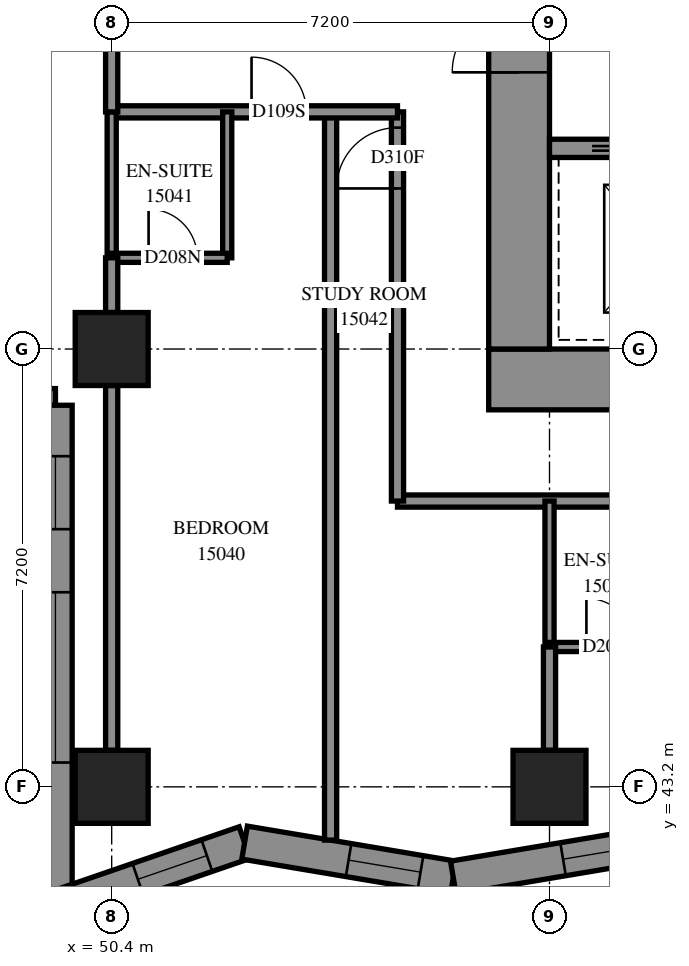
"""IFC4 building model, lengths in metres.
Left out: names, types, materials, properties, quantities, classifications, styles, units other than length and angle.
Written with IfcOpenShell. Run it as: python <this file> out.ifc"""

import sys

from ifc_helpers import new_model, si_unit, direction, frame, frame_2d, origin, origin_2d, place, context, subcontext, project, spatial, polyline, rectangle, outline, extrude, element, fill, save


model = new_model("IFC4")
c1 = context("Model", 3, precision=1e-05, world=origin(), true_north=direction((0.0, 1.0)))
c2 = subcontext(c1, "Body", "Model", "MODEL_VIEW")
j1 = project(units=[si_unit("LENGTHUNIT", "METRE"), si_unit("PLANEANGLEUNIT", "RADIAN")], contexts=[c1])
p1 = place(None, origin())
s1 = spatial("IfcSite", under=j1, at=p1, CompositionType="ELEMENT")
p2 = place(p1, origin())
s2 = spatial("IfcBuilding", under=s1, at=p2, CompositionType="ELEMENT")
p3 = place(p2, frame((0.0, 0.0, 57.6)))
s3 = spatial("IfcBuildingStorey", under=s2, at=p3, CompositionType="ELEMENT", Elevation=57.6)
for number, where, z_axis, x_axis in (
    (1, (50.4, 43.2, 0.0), (0.0, 0.0, 1.0), (1.0, 0.0, 0.0)),
    (2, (50.4, 50.4, 0.0), (0.0, 0.0, 1.0), (1.0, 0.0, 0.0)),
    (3, (57.6, 43.2, 0.0), (0.0, 0.0, 1.0), (1.0, 0.0, 0.0)),
):
    element("IfcColumn", number, at=place(p3, frame(where, z_axis=z_axis, x_axis=x_axis)), inside=s3, PredefinedType="COLUMN", context=c2, shape_type="SweptSolid", body=[
        extrude(rectangle(XDim=1.2, YDim=1.2, at=origin_2d()), origin(), (0.0, 0.0, 1.0), 3.1),
    ])
p4 = place(p3, frame((56.6, 49.9, -0.3), z_axis=(0.0, 0.0, 1.0), x_axis=(1.0, 0.0, 0.0)))
e4 = element("IfcWall", 4, at=p4, inside=s3, PredefinedType="SHEAR", context=c2, shape_type="SweptSolid", body=[
    extrude(rectangle(XDim=16.4, YDim=1.0, at=frame_2d((8.2, 0.0))), origin(), (0.0, 0.0, 1.0), 2.7),
])
p5 = place(p3, frame((57.1, 50.4, -0.3), z_axis=(0.0, 0.0, 1.0), x_axis=(0.0, 1.0, 0.0)))
e5 = element("IfcWall", 5, at=p5, inside=s3, PredefinedType="SHEAR", context=c2, shape_type="SweptSolid", body=[
    extrude(rectangle(XDim=14.4, YDim=1.0, at=frame_2d((7.2, 0.0))), origin(), (0.0, 0.0, 1.0), 2.7),
])
p6 = place(p5, frame((4.55, 0.0, 0.3)))
e6 = element("IfcOpeningElement", 6, at=p6, cuts=e5, PredefinedType="OPENING", context=c2, shape_type="SweptSolid", body=[
    extrude(rectangle(XDim=1.1, YDim=2.1, at=frame_2d((0.55, 1.05))), frame((0.0, 0.51, 0.0), z_axis=(0.0, -1.0, 0.0), x_axis=(1.0, 0.0, 0.0)), (0.0, 0.0, 1.0), 1.02),
])
p7 = place(p5, frame((11.35, 0.0, 0.3)))
e7 = element("IfcOpeningElement", 7, at=p7, cuts=e5, PredefinedType="OPENING", context=c2, shape_type="SweptSolid", body=[
    extrude(rectangle(XDim=1.1, YDim=2.1, at=frame_2d((0.55, 1.05))), frame((0.0, 0.51, 0.0), z_axis=(0.0, -1.0, 0.0), x_axis=(1.0, 0.0, 0.0)), (0.0, 0.0, 1.0), 1.02),
])
p8 = place(p3, frame((57.6, 53.7, 0.0), z_axis=(0.0, 0.0, 1.0), x_axis=(1.0, 0.0, 0.0)))
e8 = element("IfcWall", 8, at=p8, inside=s3, PredefinedType="SOLIDWALL", context=c2, shape_type="SweptSolid", body=[
    extrude(rectangle(XDim=14.4, YDim=0.3, at=frame_2d((7.2, 0.0))), origin(), (0.0, 0.0, 1.0), 3.1),
])
p9 = place(p8, frame((1.25, 0.0, 0.0)))
e9 = element("IfcOpeningElement", 9, at=p9, cuts=e8, PredefinedType="OPENING", context=c2, shape_type="SweptSolid", body=[
    extrude(rectangle(XDim=1.1, YDim=2.1, at=frame_2d((0.55, 1.05))), frame((0.0, 0.16, 0.0), z_axis=(0.0, -1.0, 0.0), x_axis=(1.0, 0.0, 0.0)), (0.0, 0.0, 1.0), 0.32),
])
p10 = place(p8, frame((4.85, 0.0, 0.0)))
e10 = element("IfcOpeningElement", 10, at=p10, cuts=e8, PredefinedType="OPENING", context=c2, shape_type="SweptSolid", body=[
    extrude(rectangle(XDim=1.1, YDim=2.1, at=frame_2d((0.55, 1.05))), frame((0.0, 0.16, 0.0), z_axis=(0.0, -1.0, 0.0), x_axis=(1.0, 0.0, 0.0)), (0.0, 0.0, 1.0), 0.32),
])
p11 = place(p8, frame((8.45, 0.0, 0.0)))
e11 = element("IfcOpeningElement", 11, at=p11, cuts=e8, PredefinedType="OPENING", context=c2, shape_type="SweptSolid", body=[
    extrude(rectangle(XDim=1.1, YDim=2.1, at=frame_2d((0.55, 1.05))), frame((0.0, 0.16, 0.0), z_axis=(0.0, -1.0, 0.0), x_axis=(1.0, 0.0, 0.0)), (0.0, 0.0, 1.0), 0.32),
])
p12 = place(p8, frame((12.05, 0.0, 0.0)))
e12 = element("IfcOpeningElement", 12, at=p12, cuts=e8, PredefinedType="OPENING", context=c2, shape_type="SweptSolid", body=[
    extrude(rectangle(XDim=1.1, YDim=2.1, at=frame_2d((0.55, 1.05))), frame((0.0, 0.16, 0.0), z_axis=(0.0, -1.0, 0.0), x_axis=(1.0, 0.0, 0.0)), (0.0, 0.0, 1.0), 0.32),
])
p13 = place(p3, frame((42.275, 49.475, 0.0), z_axis=(0.0, 0.0, 1.0), x_axis=(1.0, 0.0, 0.0)))
e13 = element("IfcWall", 13, at=p13, inside=s3, PredefinedType="SOLIDWALL", context=c2, shape_type="SweptSolid", body=[
    extrude(outline(polyline([(-0.275, -0.275), (6.925, -0.275), (7.475, 0.275), (0.275, 0.275), (-0.275, -0.275)])), origin(), (0.0, 0.0, 1.0), 3.1),
])
p14 = place(p13, frame((1.325, 0.0, 0.5)))
e14 = element("IfcOpeningElement", 14, at=p14, cuts=e13, PredefinedType="OPENING", context=c2, shape_type="SweptSolid", body=[
    extrude(rectangle(XDim=2.8, YDim=2.45, at=frame_2d((1.4, 1.225))), frame((0.0, 0.285, 0.0), z_axis=(0.0, -1.0, 0.0), x_axis=(1.0, 0.0, 0.0)), (0.0, 0.0, 1.0), 0.57),
])
p15 = place(p13, frame((5.162, 0.0, 0.5)))
e15 = element("IfcOpeningElement", 15, at=p15, cuts=e13, PredefinedType="OPENING", context=c2, shape_type="SweptSolid", body=[
    extrude(rectangle(XDim=1.2, YDim=2.45, at=frame_2d((0.6, 1.225))), frame((0.0, 0.285, 0.0), z_axis=(0.0, -1.0, 0.0), x_axis=(1.0, 0.0, 0.0)), (0.0, 0.0, 1.0), 0.57),
])
p16 = place(p3, frame((49.475, 49.475, 0.0), z_axis=(0.0, 0.0, 1.0), x_axis=(0.0, -1.0, 0.0)))
e16 = element("IfcWall", 16, at=p16, inside=s3, PredefinedType="SOLIDWALL", context=c2, shape_type="SweptSolid", body=[
    extrude(outline(polyline([(0.275, -0.275), (8.647, -0.275), (7.876, 0.275), (-0.275, 0.275), (0.275, -0.275)])), origin(), (0.0, 0.0, 1.0), 3.1),
])
p17 = place(p16, frame((3.075, 0.0, 0.5)))
e17 = element("IfcOpeningElement", 17, at=p17, cuts=e16, PredefinedType="OPENING", context=c2, shape_type="SweptSolid", body=[
    extrude(rectangle(XDim=2.8, YDim=2.45, at=frame_2d((1.4, 1.225))), frame((0.0, 0.285, 0.0), z_axis=(0.0, -1.0, 0.0), x_axis=(1.0, 0.0, 0.0)), (0.0, 0.0, 1.0), 0.57),
])
p18 = place(p16, frame((0.838, 0.0, 0.5)))
e18 = element("IfcOpeningElement", 18, at=p18, cuts=e16, PredefinedType="OPENING", context=c2, shape_type="SweptSolid", body=[
    extrude(rectangle(XDim=1.2, YDim=2.45, at=frame_2d((0.6, 1.225))), frame((0.0, 0.285, 0.0), z_axis=(0.0, -1.0, 0.0), x_axis=(1.0, 0.0, 0.0)), (0.0, 0.0, 1.0), 0.57),
])
p19 = place(p3, frame((49.475, 41.213, 0.0), z_axis=(0.0, 0.0, 1.0), x_axis=(0.9456585559, 0.3251613379, 0.0)))
e19 = element("IfcWall", 19, at=p19, inside=s3, PredefinedType="SOLIDWALL", context=c2, shape_type="SweptSolid", body=[
    extrude(outline(polyline([(-0.385, -0.275), (3.219, -0.275), (3.359, 0.275), (0.385, 0.275), (-0.385, -0.275)])), origin(), (0.0, 0.0, 1.0), 3.1),
])
p20 = place(p19, frame((1.434, 0.0, 0.5)))
e20 = element("IfcOpeningElement", 20, at=p20, cuts=e19, PredefinedType="OPENING", context=c2, shape_type="SweptSolid", body=[
    extrude(rectangle(XDim=1.2, YDim=2.45, at=frame_2d((0.6, 1.225))), frame((0.0, 0.285, 0.0), z_axis=(0.0, -1.0, 0.0), x_axis=(1.0, 0.0, 0.0)), (0.0, 0.0, 1.0), 0.57),
])
p21 = place(p3, frame((52.585, 42.283, 0.0), z_axis=(0.0, 0.0, 1.0), x_axis=(0.9862084709, -0.1655078606, 0.0)))
e21 = element("IfcWall", 21, at=p21, inside=s3, PredefinedType="SOLIDWALL", context=c2, shape_type="SweptSolid", body=[
    extrude(outline(polyline([(0.07, -0.275), (3.526, -0.275), (3.434, 0.275), (-0.07, 0.275), (0.07, -0.275)])), origin(), (0.0, 0.0, 1.0), 3.1),
])
p22 = place(p21, frame((1.734, 0.0, 0.5)))
e22 = element("IfcOpeningElement", 22, at=p22, cuts=e21, PredefinedType="OPENING", context=c2, shape_type="SweptSolid", body=[
    extrude(rectangle(XDim=1.2, YDim=2.45, at=frame_2d((0.6, 1.225))), frame((0.0, 0.285, 0.0), z_axis=(0.0, -1.0, 0.0), x_axis=(1.0, 0.0, 0.0)), (0.0, 0.0, 1.0), 0.57),
])
p23 = place(p3, frame((56.018, 41.707, 0.0), z_axis=(0.0, 0.0, 1.0), x_axis=(0.9862119159, 0.1654873316, 0.0)))
e23 = element("IfcWall", 23, at=p23, inside=s3, PredefinedType="SOLIDWALL", context=c2, shape_type="SweptSolid", body=[
    extrude(outline(polyline([(-0.046, -0.275), (3.41, -0.275), (3.503, 0.275), (0.046, 0.275), (-0.046, -0.275)])), origin(), (0.0, 0.0, 1.0), 3.1),
])
p24 = place(p23, frame((1.831, 0.0, 0.5)))
e24 = element("IfcOpeningElement", 24, at=p24, cuts=e23, PredefinedType="OPENING", context=c2, shape_type="SweptSolid", body=[
    extrude(rectangle(XDim=1.2, YDim=2.45, at=frame_2d((0.6, 1.225))), frame((0.0, 0.285, 0.0), z_axis=(0.0, -1.0, 0.0), x_axis=(1.0, 0.0, 0.0)), (0.0, 0.0, 1.0), 0.57),
])
p25 = place(p3, frame((55.1, 47.9, 0.0), z_axis=(0.0, 0.0, 1.0), x_axis=(1.0, 0.0, 0.0)))
e25 = element("IfcWall", 25, at=p25, inside=s3, PredefinedType="PARTITIONING", context=c2, shape_type="SweptSolid", body=[
    extrude(rectangle(XDim=19.208, YDim=0.2, at=frame_2d((9.604, 0.0))), origin(), (0.0, 0.0, 1.0), 3.1),
])
p26 = place(p25, frame((6.399, 0.0, 0.0)))
e26 = element("IfcOpeningElement", 26, at=p26, cuts=e25, PredefinedType="OPENING", context=c2, shape_type="SweptSolid", body=[
    extrude(rectangle(XDim=0.9, YDim=2.1, at=frame_2d((0.45, 1.05))), frame((0.0, 0.11, 0.0), z_axis=(0.0, -1.0, 0.0), x_axis=(1.0, 0.0, 0.0)), (0.0, 0.0, 1.0), 0.22),
])
p27 = place(p25, frame((13.561, 0.0, 0.0)))
e27 = element("IfcOpeningElement", 27, at=p27, cuts=e25, PredefinedType="OPENING", context=c2, shape_type="SweptSolid", body=[
    extrude(rectangle(XDim=0.9, YDim=2.1, at=frame_2d((0.45, 1.05))), frame((0.0, 0.11, 0.0), z_axis=(0.0, -1.0, 0.0), x_axis=(1.0, 0.0, 0.0)), (0.0, 0.0, 1.0), 0.22),
])
p28 = place(p3, frame((54.0, 42.324, 0.0), z_axis=(0.0, 0.0, 1.0), x_axis=(0.0, 1.0, 0.0)))
e28 = element("IfcWall", 28, at=p28, inside=s3, PredefinedType="PARTITIONING", context=c2, shape_type="SweptSolid", body=[
    extrude(rectangle(XDim=11.976, YDim=0.2, at=frame_2d((5.988, 0.0))), origin(), (0.0, 0.0, 1.0), 3.1),
])
p29 = place(p3, frame((55.1, 47.9, 0.0), z_axis=(0.0, 0.0, 1.0), x_axis=(0.0, 1.0, 0.0)))
e29 = element("IfcWall", 29, at=p29, inside=s3, PredefinedType="PARTITIONING", context=c2, shape_type="SweptSolid", body=[
    extrude(rectangle(XDim=6.4, YDim=0.2, at=frame_2d((3.2, 0.0))), origin(), (0.0, 0.0, 1.0), 3.1),
])
p30 = place(p29, frame((5.141, 0.0, 0.0)))
e30 = element("IfcOpeningElement", 30, at=p30, cuts=e29, PredefinedType="OPENING", context=c2, shape_type="SweptSolid", body=[
    extrude(rectangle(XDim=1.0, YDim=2.1, at=frame_2d((0.5, 1.05))), frame((0.0, 0.11, 0.0), z_axis=(0.0, -1.0, 0.0), x_axis=(1.0, 0.0, 0.0)), (0.0, 0.0, 1.0), 0.22),
])
p31 = place(p3, frame((50.4, 43.8, 0.0), z_axis=(0.0, 0.0, 1.0), x_axis=(0.0, 1.0, 0.0)))
e31 = element("IfcWall", 31, at=p31, inside=s3, PredefinedType="PARTITIONING", context=c2, shape_type="SweptSolid", body=[
    extrude(rectangle(XDim=6.0, YDim=0.2, at=frame_2d((3.0, 0.0))), origin(), (0.0, 0.0, 1.0), 2.6),
])
p32 = place(p3, frame((50.4, 54.3, 0.0), z_axis=(0.0, 0.0, 1.0), x_axis=(1.0, 0.0, 0.0)))
e32 = element("IfcWall", 32, at=p32, inside=s3, PredefinedType="PARTITIONING", context=c2, shape_type="SweptSolid", body=[
    extrude(rectangle(XDim=4.7, YDim=0.2, at=frame_2d((2.35, 0.0))), origin(), (0.0, 0.0, 1.0), 3.1),
])
p33 = place(p32, frame((2.3, 0.0, 0.0)))
e33 = element("IfcOpeningElement", 33, at=p33, cuts=e32, PredefinedType="OPENING", context=c2, shape_type="SweptSolid", body=[
    extrude(rectangle(XDim=0.9, YDim=2.1, at=frame_2d((0.45, 1.05))), frame((0.0, 0.11, 0.0), z_axis=(0.0, -1.0, 0.0), x_axis=(1.0, 0.0, 0.0)), (0.0, 0.0, 1.0), 0.22),
])
for number, where, z_axis, x_axis in (
    (34, (52.3, 51.9, 0.0), (0.0, 0.0, 1.0), (0.0, 1.0, 0.0)),
    (35, (50.4, 51.9, 0.0), (0.0, 0.0, 1.0), (0.0, 1.0, 0.0)),
    (36, (57.6, 45.5, 0.0), (0.0, 0.0, 1.0), (0.0, 1.0, 0.0)),
):
    element("IfcWall", number, at=place(p3, frame(where, z_axis=z_axis, x_axis=x_axis)), inside=s3, PredefinedType="PARTITIONING", context=c2, shape_type="SweptSolid", body=[
        extrude(rectangle(XDim=2.4, YDim=0.15, at=frame_2d((1.2, 0.0))), origin(), (0.0, 0.0, 1.0), 3.1),
    ])
p34 = place(p3, frame((50.4, 51.9, 0.0), z_axis=(0.0, 0.0, 1.0), x_axis=(1.0, 0.0, 0.0)))
e37 = element("IfcWall", 37, at=p34, inside=s3, PredefinedType="PARTITIONING", context=c2, shape_type="SweptSolid", body=[
    extrude(rectangle(XDim=1.9, YDim=0.15, at=frame_2d((0.95, 0.0))), origin(), (0.0, 0.0, 1.0), 3.1),
])
p35 = place(p34, frame((0.607, 0.0, 0.0)))
e38 = element("IfcOpeningElement", 38, at=p35, cuts=e37, PredefinedType="OPENING", context=c2, shape_type="SweptSolid", body=[
    extrude(rectangle(XDim=0.8, YDim=2.1, at=frame_2d((0.4, 1.05))), frame((0.0, 0.085, 0.0), z_axis=(0.0, -1.0, 0.0), x_axis=(1.0, 0.0, 0.0)), (0.0, 0.0, 1.0), 0.17),
])
p36 = place(p3, frame((57.6, 45.5, 0.0), z_axis=(0.0, 0.0, 1.0), x_axis=(1.0, 0.0, 0.0)))
e39 = element("IfcWall", 39, at=p36, inside=s3, PredefinedType="PARTITIONING", context=c2, shape_type="SweptSolid", body=[
    extrude(rectangle(XDim=1.9, YDim=0.15, at=frame_2d((0.95, 0.0))), origin(), (0.0, 0.0, 1.0), 3.1),
])
p37 = place(p36, frame((0.607, 0.0, 0.0)))
e40 = element("IfcOpeningElement", 40, at=p37, cuts=e39, PredefinedType="OPENING", context=c2, shape_type="SweptSolid", body=[
    extrude(rectangle(XDim=0.8, YDim=2.1, at=frame_2d((0.4, 1.05))), frame((0.0, 0.085, 0.0), z_axis=(0.0, -1.0, 0.0), x_axis=(1.0, 0.0, 0.0)), (0.0, 0.0, 1.0), 0.17),
])
p38 = place(p3, frame((50.4, 54.3, 0.0), z_axis=(0.0, 0.0, 1.0), x_axis=(0.0, 1.0, 0.0)))
e41 = element("IfcWall", 41, at=p38, inside=s3, PredefinedType="PARTITIONING", context=c2, shape_type="SweptSolid", body=[
    extrude(rectangle(XDim=1.8, YDim=0.2, at=frame_2d((0.9, 0.0))), origin(), (0.0, 0.0, 1.0), 3.1),
])
p39 = place(p3, frame((57.6, 43.8, 0.0), z_axis=(0.0, 0.0, 1.0), x_axis=(0.0, 1.0, 0.0)))
e42 = element("IfcWall", 42, at=p39, inside=s3, PredefinedType="PARTITIONING", context=c2, shape_type="SweptSolid", body=[
    extrude(rectangle(XDim=1.7, YDim=0.2, at=frame_2d((0.85, 0.0))), origin(), (0.0, 0.0, 1.0), 3.1),
])
p40 = place(p3, frame((50.4, 51.0, 0.0), z_axis=(0.0, 0.0, 1.0), x_axis=(0.0, 1.0, 0.0)))
e43 = element("IfcWall", 43, at=p40, inside=s3, PredefinedType="PARTITIONING", context=c2, shape_type="SweptSolid", body=[
    extrude(rectangle(XDim=0.9, YDim=0.2, at=frame_2d((0.45, 0.0))), origin(), (0.0, 0.0, 1.0), 3.1),
])
p41 = place(p17, origin())
e44 = element("IfcWindow", 44, at=p41, inside=s3, PartitioningType="SINGLE_PANEL", PredefinedType="WINDOW", context=c2, shape_type="SweptSolid", body=[
    extrude(rectangle(XDim=2.8, YDim=2.45, at=frame_2d((1.4, 1.225))), frame((0.0, 0.155, 0.0), z_axis=(0.0, -1.0, 0.0), x_axis=(1.0, 0.0, 0.0)), (0.0, 0.0, 1.0), 0.06),
])
fill(e17, e44)
p42 = place(p18, origin())
e45 = element("IfcWindow", 45, at=p42, inside=s3, PartitioningType="SINGLE_PANEL", PredefinedType="WINDOW", context=c2, shape_type="SweptSolid", body=[
    extrude(rectangle(XDim=1.2, YDim=2.45, at=frame_2d((0.6, 1.225))), frame((0.0, 0.155, 0.0), z_axis=(0.0, -1.0, 0.0), x_axis=(1.0, 0.0, 0.0)), (0.0, 0.0, 1.0), 0.06),
])
fill(e18, e45)
p43 = place(p20, origin())
e46 = element("IfcWindow", 46, at=p43, inside=s3, PartitioningType="SINGLE_PANEL", PredefinedType="WINDOW", context=c2, shape_type="SweptSolid", body=[
    extrude(rectangle(XDim=1.2, YDim=2.45, at=frame_2d((0.6, 1.225))), frame((0.0, 0.155, 0.0), z_axis=(0.0, -1.0, 0.0), x_axis=(1.0, 0.0, 0.0)), (0.0, 0.0, 1.0), 0.06),
])
fill(e20, e46)
p44 = place(p22, origin())
e47 = element("IfcWindow", 47, at=p44, inside=s3, PartitioningType="SINGLE_PANEL", PredefinedType="WINDOW", context=c2, shape_type="SweptSolid", body=[
    extrude(rectangle(XDim=1.2, YDim=2.45, at=frame_2d((0.6, 1.225))), frame((0.0, 0.155, 0.0), z_axis=(0.0, -1.0, 0.0), x_axis=(1.0, 0.0, 0.0)), (0.0, 0.0, 1.0), 0.06),
])
fill(e22, e47)
p45 = place(p24, origin())
e48 = element("IfcWindow", 48, at=p45, inside=s3, PartitioningType="SINGLE_PANEL", PredefinedType="WINDOW", context=c2, shape_type="SweptSolid", body=[
    extrude(rectangle(XDim=1.2, YDim=2.45, at=frame_2d((0.6, 1.225))), frame((0.0, 0.155, 0.0), z_axis=(0.0, -1.0, 0.0), x_axis=(1.0, 0.0, 0.0)), (0.0, 0.0, 1.0), 0.06),
])
fill(e24, e48)
p46 = place(p6, origin())
e49 = element("IfcDoor", 49, at=p46, inside=s3, OperationType="DOUBLE_DOOR_SINGLE_SWING", PredefinedType="DOOR", context=c2, shape_type="SweptSolid", body=[
    extrude(rectangle(XDim=1.1, YDim=2.1, at=frame_2d((0.55, 1.05))), frame((0.0, 0.025, 0.0), z_axis=(0.0, -1.0, 0.0), x_axis=(1.0, 0.0, 0.0)), (0.0, 0.0, 1.0), 0.05),
])
fill(e6, e49)
p47 = place(p33, origin())
e50 = element("IfcDoor", 50, at=p47, inside=s3, OperationType="SINGLE_SWING_LEFT", PredefinedType="DOOR", context=c2, shape_type="SweptSolid", body=[
    extrude(rectangle(XDim=0.9, YDim=2.1, at=frame_2d((0.45, 1.05))), frame((0.0, 0.025, 0.0), z_axis=(0.0, -1.0, 0.0), x_axis=(1.0, 0.0, 0.0)), (0.0, 0.0, 1.0), 0.05),
])
fill(e33, e50)
p48 = place(p35, origin())
e51 = element("IfcDoor", 51, at=p48, inside=s3, OperationType="SINGLE_SWING_RIGHT", PredefinedType="DOOR", context=c2, shape_type="SweptSolid", body=[
    extrude(rectangle(XDim=0.8, YDim=2.1, at=frame_2d((0.4, 1.05))), frame((0.0, 0.025, 0.0), z_axis=(0.0, -1.0, 0.0), x_axis=(1.0, 0.0, 0.0)), (0.0, 0.0, 1.0), 0.05),
])
fill(e38, e51)
p49 = place(p30, origin())
e52 = element("IfcDoor", 52, at=p49, inside=s3, OperationType="SINGLE_SWING_RIGHT", PredefinedType="DOOR", context=c2, shape_type="SweptSolid", body=[
    extrude(rectangle(XDim=1.0, YDim=2.1, at=frame_2d((0.5, 1.05))), frame((0.0, 0.025, 0.0), z_axis=(0.0, -1.0, 0.0), x_axis=(1.0, 0.0, 0.0)), (0.0, 0.0, 1.0), 0.05),
])
fill(e30, e52)
p50 = place(p37, origin())
e53 = element("IfcDoor", 53, at=p50, inside=s3, OperationType="SINGLE_SWING_RIGHT", PredefinedType="DOOR", context=c2, shape_type="SweptSolid", body=[
    extrude(rectangle(XDim=0.8, YDim=2.1, at=frame_2d((0.4, 1.05))), frame((0.0, 0.025, 0.0), z_axis=(0.0, -1.0, 0.0), x_axis=(1.0, 0.0, 0.0)), (0.0, 0.0, 1.0), 0.05),
])
fill(e40, e53)
save(model, sys.argv[1])
